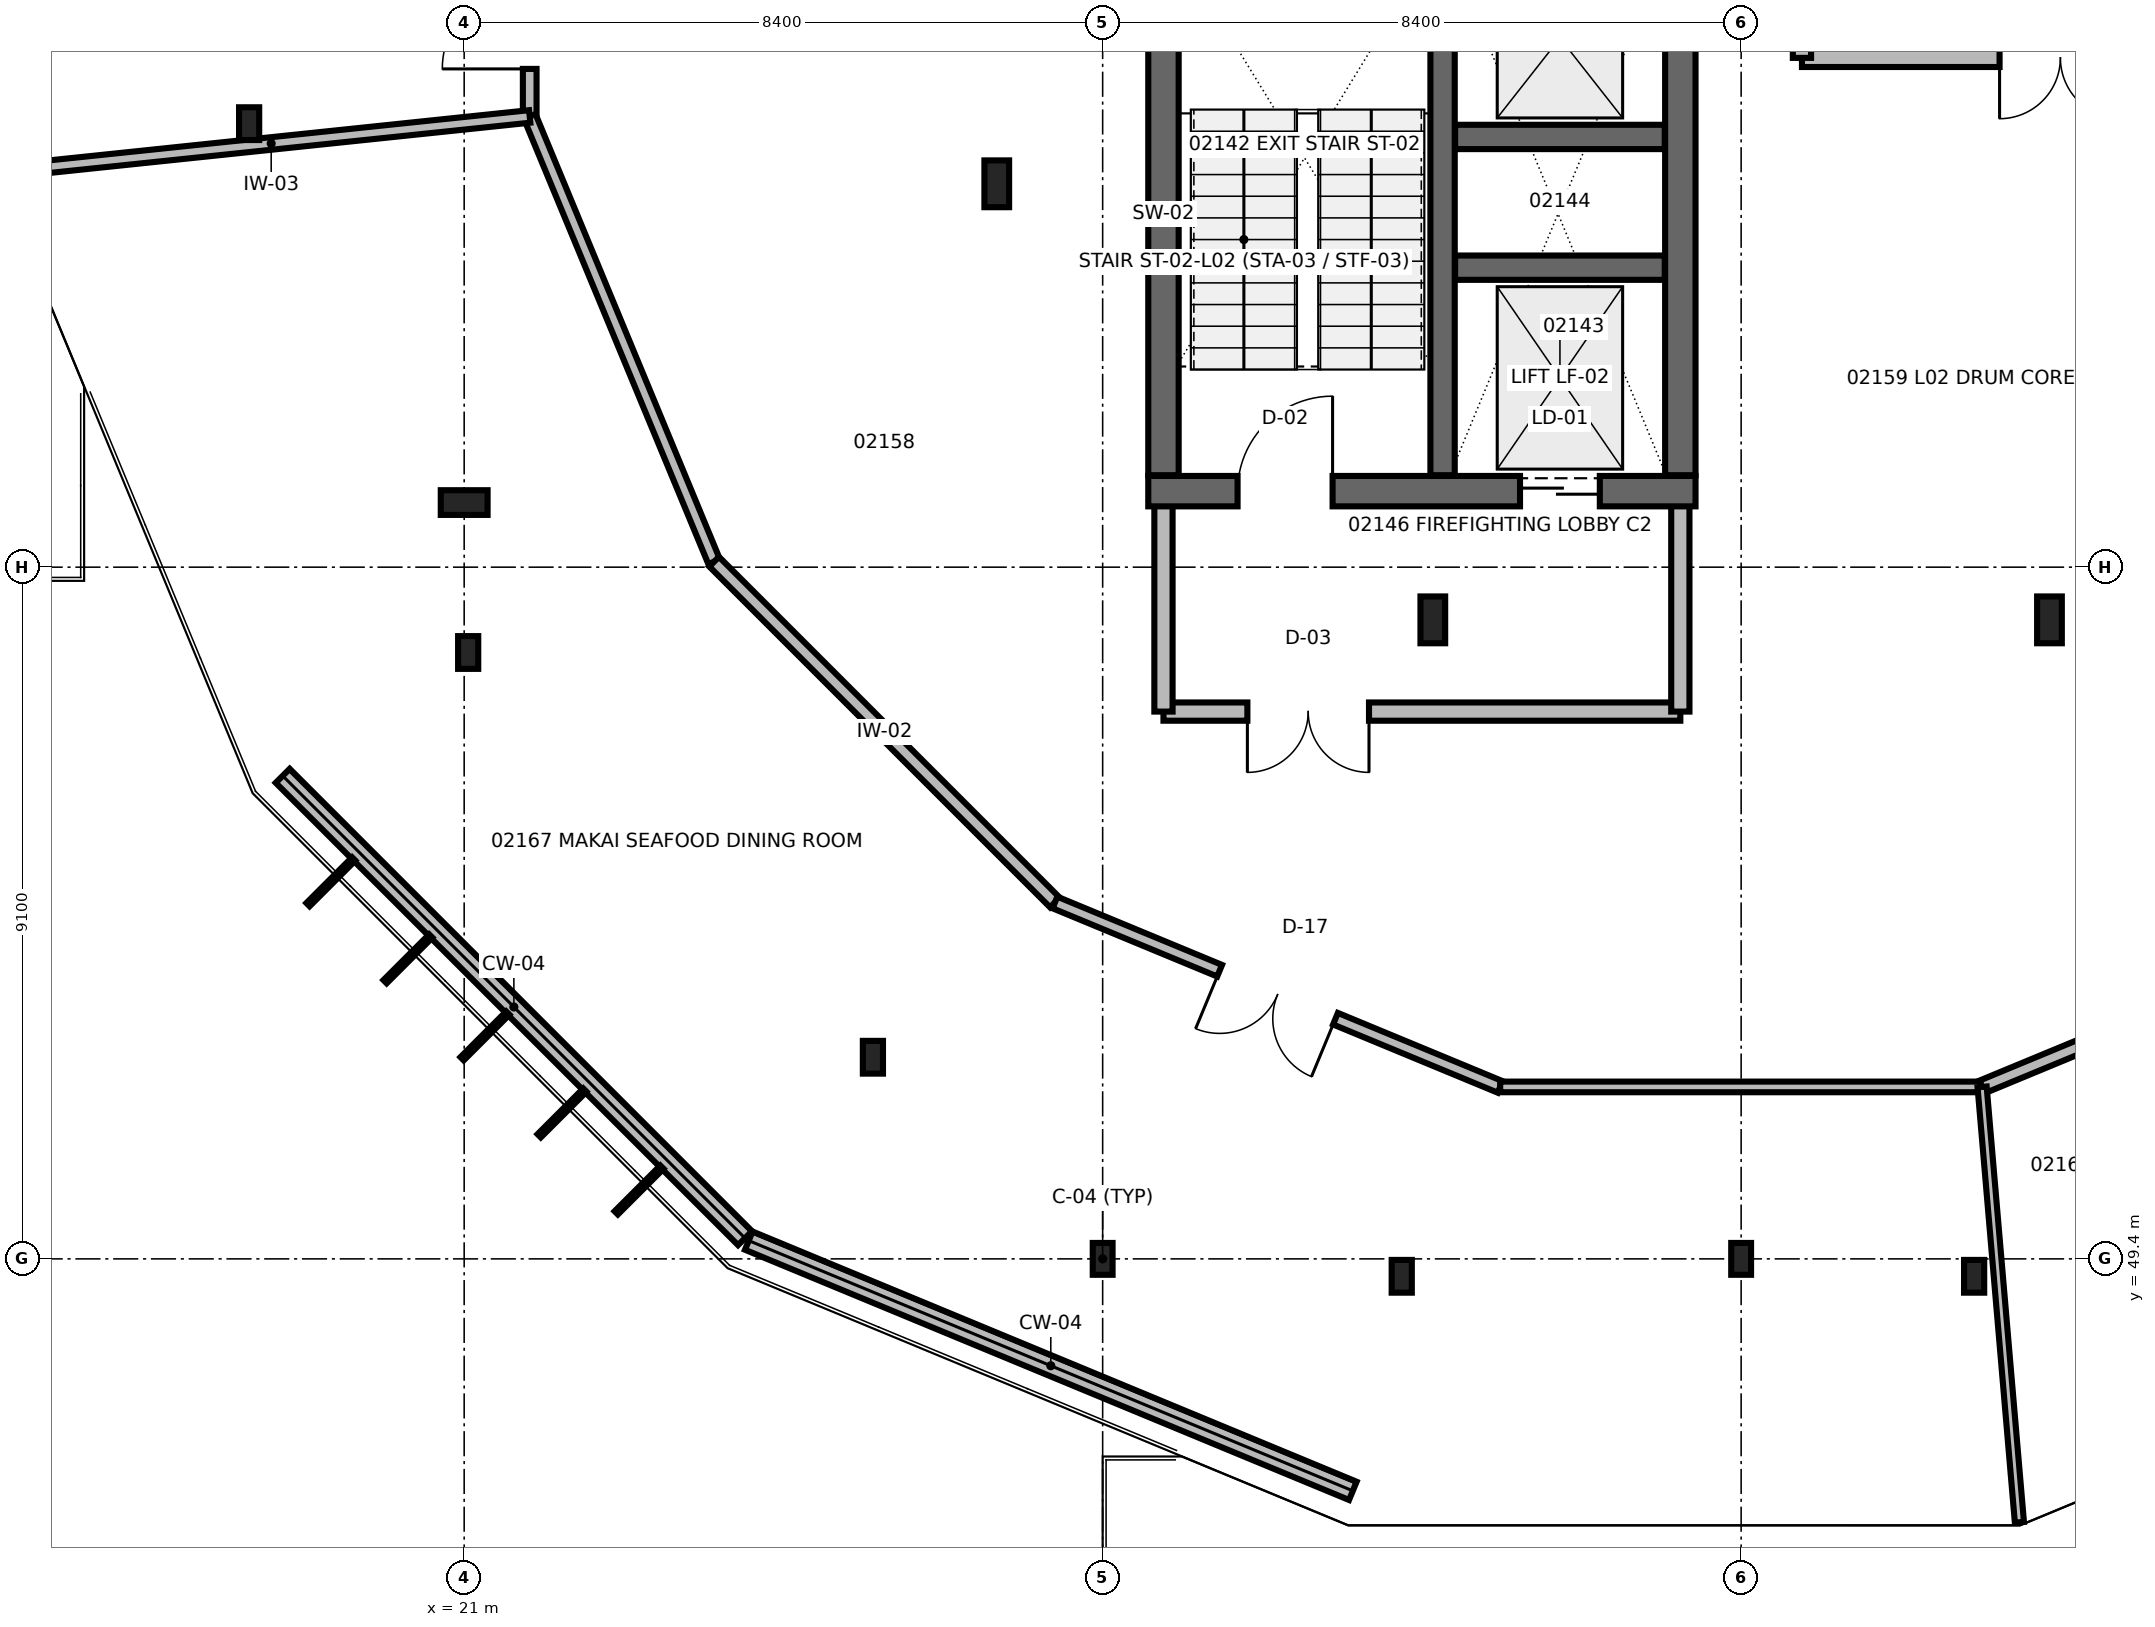
"""IFC4 building model, lengths in metres.
Left out: names, types, materials, properties, quantities, classifications, styles, units other than length and angle.
Written with IfcOpenShell. Run it as: python <this file> out.ifc"""

import sys

from ifc_helpers import new_model, si_unit, direction, frame, frame_2d, origin, origin_2d, place, context, subcontext, project, spatial, rectangle, i_section, extrude, element, fill, save


model = new_model("IFC4")
c1 = context("Model", 3, precision=1e-05, world=origin(), true_north=direction((0.0, 1.0)))
c2 = subcontext(c1, "Body", "Model", "MODEL_VIEW")
j1 = project(units=[si_unit("LENGTHUNIT", "METRE"), si_unit("PLANEANGLEUNIT", "RADIAN")], contexts=[c1])
p1 = place(None, origin())
s1 = spatial("IfcSite", under=j1, at=p1, CompositionType="ELEMENT")
p2 = place(p1, origin())
s2 = spatial("IfcBuilding", under=s1, at=p2, CompositionType="ELEMENT")
p3 = place(p2, frame((0.0, 0.0, 9.6)))
s3 = spatial("IfcBuildingStorey", under=s2, at=p3, CompositionType="ELEMENT", Elevation=9.6)
for number, where, z_axis, x_axis in (
    (1, (28.007, 63.544, 0.0), (0.0, 0.0, 1.0), (1.0, 0.0, 0.0)),
    (2, (33.744, 57.807, 0.0), (0.0, 0.0, 1.0), (1.0, 0.0, 0.0)),
    (3, (41.856, 57.807, 0.0), (0.0, 0.0, 1.0), (1.0, 0.0, 0.0)),
):
    element("IfcColumn", number, at=place(p3, frame(where, z_axis=z_axis, x_axis=x_axis)), inside=s3, PredefinedType="COLUMN", context=c2, shape_type="SweptSolid", body=[
        extrude(i_section(OverallWidth=0.325, OverallDepth=0.616, WebThickness=0.014, FlangeThickness=0.021, at=origin_2d()), origin(), (0.0, 0.0, 1.0), 4.2),
    ])
for number, where, z_axis, x_axis in (
    (4, (18.171, 64.335, 0.0), (0.0, 0.0, 1.0), (1.0, 0.0, 0.0)),
    (5, (21.052, 57.377, 0.0), (0.0, 0.0, 1.0), (1.0, 0.0, 0.0)),
    (6, (26.377, 52.052, 0.0), (0.0, 0.0, 1.0), (1.0, 0.0, 0.0)),
    (7, (33.335, 49.171, 0.0), (0.0, 0.0, 1.0), (1.0, 0.0, 0.0)),
    (8, (40.865, 49.171, 0.0), (0.0, 0.0, 1.0), (1.0, 0.0, 0.0)),
):
    element("IfcColumn", number, at=place(p3, frame(where, z_axis=z_axis, x_axis=x_axis)), inside=s3, PredefinedType="COLUMN", context=c2, shape_type="SweptSolid", body=[
        extrude(i_section(OverallWidth=0.265, OverallDepth=0.431, WebThickness=0.015, FlangeThickness=0.025, at=origin_2d()), origin(), (0.0, 0.0, 1.0), 4.2),
    ])
p4 = place(p3, frame((21.0, 59.35, 0.0), z_axis=(0.0, 0.0, 1.0), x_axis=(0.0, 1.0, 0.0)))
e9 = element("IfcColumn", 9, at=p4, inside=s3, PredefinedType="COLUMN", context=c2, shape_type="SweptSolid", body=[
    extrude(i_section(OverallWidth=0.325, OverallDepth=0.616, WebThickness=0.014, FlangeThickness=0.021, at=origin_2d()), origin(), (0.0, 0.0, 1.0), 3.62),
])
for number, where, z_axis, x_axis in (
    (10, (29.4, 49.4, 0.0), (0.0, 0.0, 1.0), (1.0, 0.0, 0.0)),
    (11, (37.8, 49.4, 0.0), (0.0, 0.0, 1.0), (1.0, 0.0, 0.0)),
):
    element("IfcColumn", number, at=place(p3, frame(where, z_axis=z_axis, x_axis=x_axis)), inside=s3, PredefinedType="COLUMN", context=c2, shape_type="SweptSolid", body=[
        extrude(i_section(OverallWidth=0.261, OverallDepth=0.419, WebThickness=0.012, FlangeThickness=0.019, at=origin_2d()), origin(), (0.0, 0.0, 1.0), 5.977),
    ])
p5 = place(p3, frame((18.613, 55.755, 0.0), z_axis=(0.0, 0.0, 1.0), x_axis=(0.707106781187, -0.707106781187, 0.0)))
e12 = element("IfcWall", 12, at=p5, inside=s3, PredefinedType="SOLIDWALL", context=c2, shape_type="SweptSolid", body=[
    extrude(rectangle(XDim=8.602, YDim=0.26, at=frame_2d((4.301, 0.0))), origin(), (0.0, 0.0, 1.0), 1.48),
])
p6 = place(p3, frame((24.744, 49.64, 0.0), z_axis=(0.0, 0.0, 1.0), x_axis=(0.923888503811, -0.382661773013, 0.0)))
e13 = element("IfcWall", 13, at=p6, inside=s3, PredefinedType="SOLIDWALL", context=c2, shape_type="SweptSolid", body=[
    extrude(rectangle(XDim=8.602, YDim=0.26, at=frame_2d((4.301, 0.0))), origin(), (0.0, 0.0, 1.0), 1.48),
])
p7 = place(p3, frame((38.6, 65.2, 0.0), z_axis=(0.0, 0.0, 1.0), x_axis=(1.0, 0.0, 0.0)))
e14 = element("IfcWall", 14, at=p7, inside=s3, PredefinedType="SOLIDWALL", context=c2, shape_type="SweptSolid", body=[
    extrude(rectangle(XDim=6.8, YDim=0.24, at=frame_2d((3.4, 0.0))), origin(), (0.0, 0.0, 1.0), 3.92),
])
p8 = place(p7, frame((2.6, 0.0, 0.0)))
e15 = element("IfcOpeningElement", 15, at=p8, cuts=e14, PredefinedType="OPENING", context=c2, shape_type="SweptSolid", body=[
    extrude(rectangle(XDim=1.6, YDim=2.2, at=frame_2d((0.8, 1.1))), frame((0.0, 0.13, 0.0), z_axis=(0.0, -1.0, 0.0), x_axis=(1.0, 0.0, 0.0)), (0.0, 0.0, 1.0), 0.26),
])
p9 = place(p3, frame((38.6, 68.4, 0.0), z_axis=(0.0, 0.0, 1.0), x_axis=(0.0, -1.0, 0.0)))
e16 = element("IfcWall", 16, at=p9, inside=s3, PredefinedType="SOLIDWALL", context=c2, shape_type="SweptSolid", body=[
    extrude(rectangle(XDim=3.2, YDim=0.24, at=frame_2d((1.6, 0.0))), origin(), (0.0, 0.0, 1.0), 3.92),
])
p10 = place(p3, frame((30.2, 56.6, 0.0), z_axis=(0.0, 0.0, 1.0), x_axis=(1.0, 0.0, 0.0)))
e17 = element("IfcWall", 17, at=p10, inside=s3, PredefinedType="SOLIDWALL", context=c2, shape_type="SweptSolid", body=[
    extrude(rectangle(XDim=6.8, YDim=0.24, at=frame_2d((3.4, 0.0))), origin(), (0.0, 0.0, 1.0), 3.304),
])
p11 = place(p10, frame((1.104, 0.0, 0.0)))
e18 = element("IfcOpeningElement", 18, at=p11, cuts=e17, PredefinedType="OPENING", context=c2, shape_type="SweptSolid", body=[
    extrude(rectangle(XDim=1.6, YDim=2.2, at=frame_2d((0.8, 1.1))), frame((0.0, 0.13, 0.0), z_axis=(0.0, -1.0, 0.0), x_axis=(1.0, 0.0, 0.0)), (0.0, 0.0, 1.0), 0.26),
])
p12 = place(p3, frame((30.2, 59.5, 0.0), z_axis=(0.0, 0.0, 1.0), x_axis=(0.0, -1.0, 0.0)))
e19 = element("IfcWall", 19, at=p12, inside=s3, PredefinedType="SOLIDWALL", context=c2, shape_type="SweptSolid", body=[
    extrude(rectangle(XDim=2.9, YDim=0.24, at=frame_2d((1.45, 0.0))), origin(), (0.0, 0.0, 1.0), 3.92),
])
p13 = place(p3, frame((37.0, 56.6, 0.0), z_axis=(0.0, 0.0, 1.0), x_axis=(0.0, 1.0, 0.0)))
e20 = element("IfcWall", 20, at=p13, inside=s3, PredefinedType="SOLIDWALL", context=c2, shape_type="SweptSolid", body=[
    extrude(rectangle(XDim=2.9, YDim=0.24, at=frame_2d((1.45, 0.0))), origin(), (0.0, 0.0, 1.0), 3.304),
])
p14 = place(p3, frame((30.0, 59.5, 0.0), z_axis=(0.0, 0.0, 1.0), x_axis=(1.0, 0.0, 0.0)))
e21 = element("IfcWall", 21, at=p14, inside=s3, PredefinedType="SHEAR", context=c2, shape_type="SweptSolid", body=[
    extrude(rectangle(XDim=7.2, YDim=0.4, at=frame_2d((3.6, 0.0))), origin(), (0.0, 0.0, 1.0), 3.92),
])
p15 = place(p14, frame((1.175, 0.0, 0.0)))
e22 = element("IfcOpeningElement", 22, at=p15, cuts=e21, PredefinedType="OPENING", context=c2, shape_type="SweptSolid", body=[
    extrude(rectangle(XDim=1.25, YDim=2.2, at=frame_2d((0.625, 1.1))), frame((0.0, 0.21, 0.0), z_axis=(0.0, -1.0, 0.0), x_axis=(1.0, 0.0, 0.0)), (0.0, 0.0, 1.0), 0.42),
])
p16 = place(p14, frame((4.891, 0.0, 0.0)))
e23 = element("IfcOpeningElement", 23, at=p16, cuts=e21, PredefinedType="OPENING", context=c2, shape_type="SweptSolid", body=[
    extrude(rectangle(XDim=1.05, YDim=2.15, at=frame_2d((0.525, 1.075))), frame((0.0, 0.21, 0.0), z_axis=(0.0, -1.0, 0.0), x_axis=(1.0, 0.0, 0.0)), (0.0, 0.0, 1.0), 0.42),
])
for number, where, z_axis, x_axis in (
    (24, (30.2, 59.71, 0.0), (0.0, 0.0, 1.0), (0.0, 1.0, 0.0)),
    (25, (37.0, 59.71, 0.0), (0.0, 0.0, 1.0), (0.0, 1.0, 0.0)),
):
    element("IfcWall", number, at=place(p3, frame(where, z_axis=z_axis, x_axis=x_axis)), inside=s3, PredefinedType="SHEAR", context=c2, shape_type="SweptSolid", body=[
        extrude(rectangle(XDim=6.88, YDim=0.4, at=frame_2d((3.44, 0.0))), origin(), (0.0, 0.0, 1.0), 3.92),
    ])
p17 = place(p3, frame((33.872, 59.71, 0.0), z_axis=(0.0, 0.0, 1.0), x_axis=(0.0, 1.0, 0.0)))
e26 = element("IfcWall", 26, at=p17, inside=s3, PredefinedType="SHEAR", context=c2, shape_type="SweptSolid", body=[
    extrude(rectangle(XDim=6.88, YDim=0.32, at=frame_2d((3.44, 0.0))), origin(), (0.0, 0.0, 1.0), 3.92),
])
for number, where, z_axis, x_axis in (
    (27, (34.037, 62.44, 0.0), (0.0, 0.0, 1.0), (1.0, 0.0, 0.0)),
    (28, (34.037, 64.16, 0.0), (0.0, 0.0, 1.0), (1.0, 0.0, 0.0)),
):
    element("IfcWall", number, at=place(p3, frame(where, z_axis=z_axis, x_axis=x_axis)), inside=s3, PredefinedType="SHEAR", context=c2, shape_type="SweptSolid", body=[
        extrude(rectangle(XDim=2.758, YDim=0.32, at=frame_2d((1.379, 0.0))), origin(), (0.0, 0.0, 1.0), 3.92),
    ])
p18 = place(p3, frame((21.862, 70.77, 0.0), z_axis=(0.0, 0.0, 1.0), x_axis=(0.0, -1.0, 0.0)))
e29 = element("IfcWall", 29, at=p18, inside=s3, PredefinedType="PARTITIONING", context=c2, shape_type="SweptSolid", body=[
    extrude(rectangle(XDim=6.341, YDim=0.18, at=frame_2d((3.17, 0.0))), origin(), (0.0, 0.0, 1.0), 3.304),
])
p19 = place(p18, frame((3.415, 0.0, 0.0)))
e30 = element("IfcOpeningElement", 30, at=p19, cuts=e29, PredefinedType="OPENING", context=c2, shape_type="SweptSolid", body=[
    extrude(rectangle(XDim=2.3, YDim=2.45, at=frame_2d((1.15, 1.225))), frame((0.0, 0.1, 0.0), z_axis=(0.0, -1.0, 0.0), x_axis=(1.0, 0.0, 0.0)), (0.0, 0.0, 1.0), 0.2),
])
p20 = place(p3, frame((21.862, 64.43, 0.0), z_axis=(0.0, 0.0, 1.0), x_axis=(0.382676004295, -0.923882609284, 0.0)))
e31 = element("IfcWall", 31, at=p20, inside=s3, PredefinedType="PARTITIONING", context=c2, shape_type="SweptSolid", body=[
    extrude(rectangle(XDim=6.34, YDim=0.165, at=frame_2d((3.17, 0.0))), origin(), (0.0, 0.0, 1.0), 3.304),
])
p21 = place(p3, frame((24.289, 58.572, 0.0), z_axis=(0.0, 0.0, 1.0), x_axis=(0.707106781187, -0.707106781187, 0.0)))
e32 = element("IfcWall", 32, at=p21, inside=s3, PredefinedType="PARTITIONING", context=c2, shape_type="SweptSolid", body=[
    extrude(rectangle(XDim=6.341, YDim=0.18, at=frame_2d((3.17, 0.0))), origin(), (0.0, 0.0, 1.0), 3.304),
])
p22 = place(p3, frame((28.772, 54.089, 0.0), z_axis=(0.0, 0.0, 1.0), x_axis=(0.92387463456, -0.382695256851, 0.0)))
e33 = element("IfcWall", 33, at=p22, inside=s3, PredefinedType="PARTITIONING", context=c2, shape_type="SweptSolid", body=[
    extrude(rectangle(XDim=6.341, YDim=0.165, at=frame_2d((3.17, 0.0))), origin(), (0.0, 0.0, 1.0), 3.304),
])
p23 = place(p22, frame((2.345, 0.0, 0.0)))
e34 = element("IfcOpeningElement", 34, at=p23, cuts=e33, PredefinedType="OPENING", context=c2, shape_type="SweptSolid", body=[
    extrude(rectangle(XDim=1.65, YDim=2.3, at=frame_2d((0.825, 1.15))), frame((0.0, 0.093, 0.0), z_axis=(0.0, -1.0, 0.0), x_axis=(1.0, 0.0, 0.0)), (0.0, 0.0, 1.0), 0.185),
])
p24 = place(p3, frame((34.63, 51.662, 0.0), z_axis=(0.0, 0.0, 1.0), x_axis=(1.0, 0.0, 0.0)))
e35 = element("IfcWall", 35, at=p24, inside=s3, PredefinedType="PARTITIONING", context=c2, shape_type="SweptSolid", body=[
    extrude(rectangle(XDim=6.34, YDim=0.14, at=frame_2d((3.17, 0.0))), origin(), (0.0, 0.0, 1.0), 3.304),
])
p25 = place(p3, frame((40.97, 51.662, 0.0), z_axis=(0.0, 0.0, 1.0), x_axis=(0.923868995071, 0.382708871005, 0.0)))
e36 = element("IfcWall", 36, at=p25, inside=s3, PredefinedType="PARTITIONING", context=c2, shape_type="SweptSolid", body=[
    extrude(rectangle(XDim=6.34, YDim=0.18, at=frame_2d((3.17, 0.0))), origin(), (0.0, 0.0, 1.0), 3.304),
])
p26 = place(p25, frame((2.195, 0.0, 0.0)))
e37 = element("IfcOpeningElement", 37, at=p26, cuts=e36, PredefinedType="OPENING", context=c2, shape_type="SweptSolid", body=[
    extrude(rectangle(XDim=1.95, YDim=2.35, at=frame_2d((0.975, 1.175))), frame((0.0, 0.1, 0.0), z_axis=(0.0, -1.0, 0.0), x_axis=(1.0, 0.0, 0.0)), (0.0, 0.0, 1.0), 0.2),
])
p27 = place(p3, frame((21.862, 64.43, 0.0), z_axis=(0.0, 0.0, 1.0), x_axis=(-0.994578946586, -0.103984224801, 0.0)))
e38 = element("IfcWall", 38, at=p27, inside=s3, PredefinedType="PARTITIONING", context=c2, shape_type="SweptSolid", body=[
    extrude(rectangle(XDim=6.839, YDim=0.165, at=frame_2d((3.42, 0.0))), origin(), (0.0, 0.0, 1.0), 2.97),
])
p28 = place(p3, frame((40.97, 51.662, 0.0), z_axis=(0.0, 0.0, 1.0), x_axis=(0.085361391725, -0.996350055353, 0.0)))
e39 = element("IfcWall", 39, at=p28, inside=s3, PredefinedType="PARTITIONING", context=c2, shape_type="SweptSolid", body=[
    extrude(rectangle(XDim=5.749, YDim=0.12, at=frame_2d((2.875, 0.0))), origin(), (0.0, 0.0, 1.0), 2.97),
])
p29 = place(p8, frame((1.6, 0.0, 0.0), z_axis=(0.0, 0.0, 1.0), x_axis=(-1.0, 0.0, 0.0)))
e40 = element("IfcDoor", 40, at=p29, inside=s3, OperationType="DOUBLE_DOOR_SINGLE_SWING", PredefinedType="DOOR", context=c2, shape_type="SweptSolid", body=[
    extrude(rectangle(XDim=1.6, YDim=2.2, at=frame_2d((0.8, 1.1))), frame((0.0, 0.025, 0.0), z_axis=(0.0, -1.0, 0.0), x_axis=(1.0, 0.0, 0.0)), (0.0, 0.0, 1.0), 0.05),
])
fill(e15, e40)
p30 = place(p11, frame((1.6, 0.0, 0.0), z_axis=(0.0, 0.0, 1.0), x_axis=(-1.0, 0.0, 0.0)))
e41 = element("IfcDoor", 41, at=p30, inside=s3, OperationType="DOUBLE_DOOR_SINGLE_SWING", PredefinedType="DOOR", context=c2, shape_type="SweptSolid", body=[
    extrude(rectangle(XDim=1.6, YDim=2.2, at=frame_2d((0.8, 1.1))), frame((0.0, 0.025, 0.0), z_axis=(0.0, -1.0, 0.0), x_axis=(1.0, 0.0, 0.0)), (0.0, 0.0, 1.0), 0.05),
])
fill(e18, e41)
p31 = place(p15, frame((1.25, 0.0, 0.0), z_axis=(0.0, 0.0, 1.0), x_axis=(-1.0, 0.0, 0.0)))
e42 = element("IfcDoor", 42, at=p31, inside=s3, OperationType="SINGLE_SWING_LEFT", PredefinedType="DOOR", context=c2, shape_type="SweptSolid", body=[
    extrude(rectangle(XDim=1.25, YDim=2.2, at=frame_2d((0.625, 1.1))), frame((0.0, 0.025, 0.0), z_axis=(0.0, -1.0, 0.0), x_axis=(1.0, 0.0, 0.0)), (0.0, 0.0, 1.0), 0.05),
])
fill(e22, e42)
p32 = place(p16, frame((1.05, 0.0, 0.0), z_axis=(0.0, 0.0, 1.0), x_axis=(-1.0, 0.0, 0.0)))
e43 = element("IfcDoor", 43, at=p32, inside=s3, OperationType="DOUBLE_DOOR_SLIDING", PredefinedType="DOOR", context=c2, shape_type="SweptSolid", body=[
    extrude(rectangle(XDim=1.05, YDim=2.15, at=frame_2d((0.525, 1.075))), frame((0.0, 0.025, 0.0), z_axis=(0.0, -1.0, 0.0), x_axis=(1.0, 0.0, 0.0)), (0.0, 0.0, 1.0), 0.05),
])
fill(e23, e43)
p33 = place(p19, frame((2.3, 0.0, 0.0), z_axis=(0.0, 0.0, 1.0), x_axis=(-1.0, 0.0, 0.0)))
e44 = element("IfcDoor", 44, at=p33, inside=s3, OperationType="DOUBLE_DOOR_SINGLE_SWING", PredefinedType="DOOR", context=c2, shape_type="SweptSolid", body=[
    extrude(rectangle(XDim=2.3, YDim=2.45, at=frame_2d((1.15, 1.225))), frame((0.0, 0.025, 0.0), z_axis=(0.0, -1.0, 0.0), x_axis=(1.0, 0.0, 0.0)), (0.0, 0.0, 1.0), 0.05),
])
fill(e30, e44)
p34 = place(p23, frame((1.65, 0.0, 0.0), z_axis=(0.0, 0.0, 1.0), x_axis=(-1.0, 0.0, 0.0)))
e45 = element("IfcDoor", 45, at=p34, inside=s3, OperationType="DOUBLE_DOOR_SINGLE_SWING", PredefinedType="DOOR", context=c2, shape_type="SweptSolid", body=[
    extrude(rectangle(XDim=1.65, YDim=2.3, at=frame_2d((0.825, 1.15))), frame((0.0, 0.025, 0.0), z_axis=(0.0, -1.0, 0.0), x_axis=(1.0, 0.0, 0.0)), (0.0, 0.0, 1.0), 0.05),
])
fill(e34, e45)
save(model, sys.argv[1])
